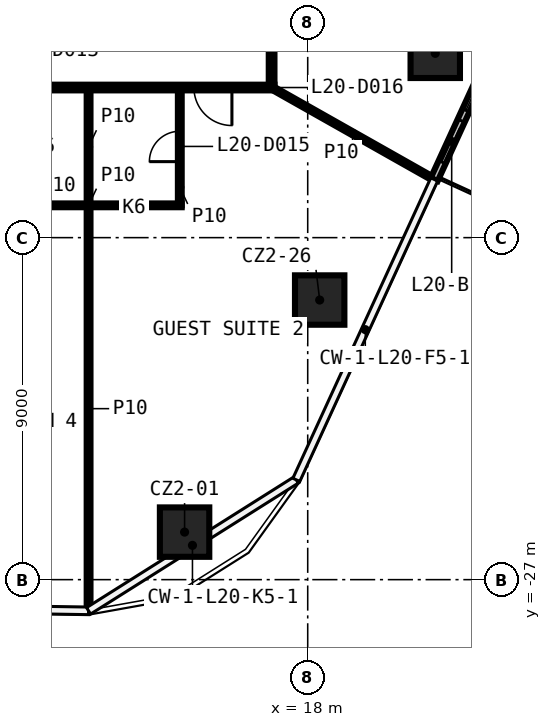
"""IFC4 building model, lengths in metres.
Left out: names, types, materials, properties, quantities, classifications, styles, units other than length and angle.
Written with IfcOpenShell. Run it as: python <this file> out.ifc"""

import sys

from ifc_helpers import new_model, si_unit, direction, frame, frame_2d, origin, origin_2d, place, context, subcontext, project, spatial, rectangle, extrude, element, fill, save


model = new_model("IFC4")
c1 = context("Model", 3, precision=1e-05, world=origin(), true_north=direction((0.0, 1.0)))
c2 = subcontext(c1, "Body", "Model", "MODEL_VIEW")
j1 = project(units=[si_unit("LENGTHUNIT", "METRE"), si_unit("PLANEANGLEUNIT", "RADIAN")], contexts=[c1])
p1 = place(None, origin())
s1 = spatial("IfcSite", under=j1, at=p1, CompositionType="ELEMENT")
p2 = place(p1, origin())
s2 = spatial("IfcBuilding", under=s1, at=p2, CompositionType="ELEMENT")
p3 = place(p2, frame((0.0, 0.0, 98.9)))
s3 = spatial("IfcBuildingStorey", under=s2, at=p3, CompositionType="ELEMENT", Elevation=98.9)
for number, where, z_axis, x_axis in (
    (1, (14.76, -25.749, 0.0), (0.0, 0.0, 1.0), (1.0, 0.0, 0.0)),
    (2, (21.356, -13.15, 0.0), (0.0, 0.0, 1.0), (1.0, 0.0, 0.0)),
    (3, (18.315, -19.642, 0.0), (0.0, 0.0, 1.0), (1.0, 0.0, 0.0)),
):
    element("IfcColumn", number, at=place(p3, frame(where, z_axis=z_axis, x_axis=x_axis)), inside=s3, PredefinedType="COLUMN", context=c2, shape_type="SweptSolid", body=[
        extrude(rectangle(XDim=1.3, YDim=1.3, at=origin_2d()), origin(), (0.0, 0.0, 1.0), 3.25),
    ])
p4 = place(p3, frame((9.784, -17.15, 0.0), z_axis=(0.0, 0.0, 1.0), x_axis=(1.0, 0.0, 0.0)))
e4 = element("IfcWall", 4, at=p4, inside=s3, PredefinedType="PARTITIONING", context=c2, shape_type="SweptSolid", body=[
    extrude(rectangle(XDim=4.9, YDim=0.1, at=frame_2d((2.45, 0.0))), origin(), (0.0, 0.0, 1.0), 3.25),
])
p5 = place(p3, frame((17.125, -14.05, 0.0), z_axis=(0.0, 0.0, 1.0), x_axis=(-1.0, 0.0, 0.0)))
e5 = element("IfcWall", 5, at=p5, inside=s3, PredefinedType="PARTITIONING", context=c2, shape_type="SweptSolid", body=[
    extrude(rectangle(XDim=34.25, YDim=0.15, at=frame_2d((17.125, 0.0))), origin(), (0.0, 0.0, 1.0), 3.25),
])
p6 = place(p5, frame((32.158, 0.0, 0.0)))
e6 = element("IfcOpeningElement", 6, at=p6, cuts=e5, PredefinedType="OPENING", context=c2, shape_type="SweptSolid", body=[
    extrude(rectangle(XDim=0.9, YDim=2.1, at=frame_2d((0.45, 1.05))), frame((0.0, 0.085, 0.0), z_axis=(0.0, -1.0, 0.0), x_axis=(1.0, 0.0, 0.0)), (0.0, 0.0, 1.0), 0.17),
])
p7 = place(p5, frame((27.561, 0.0, 0.0)))
e7 = element("IfcOpeningElement", 7, at=p7, cuts=e5, PredefinedType="OPENING", context=c2, shape_type="SweptSolid", body=[
    extrude(rectangle(XDim=1.0, YDim=2.1, at=frame_2d((0.5, 1.05))), frame((0.0, 0.085, 0.0), z_axis=(0.0, -1.0, 0.0), x_axis=(1.0, 0.0, 0.0)), (0.0, 0.0, 1.0), 0.17),
])
p8 = place(p5, frame((18.64, 0.0, 0.0)))
e8 = element("IfcOpeningElement", 8, at=p8, cuts=e5, PredefinedType="OPENING", context=c2, shape_type="SweptSolid", body=[
    extrude(rectangle(XDim=1.0, YDim=2.1, at=frame_2d((0.5, 1.05))), frame((0.0, 0.085, 0.0), z_axis=(0.0, -1.0, 0.0), x_axis=(1.0, 0.0, 0.0)), (0.0, 0.0, 1.0), 0.17),
])
p9 = place(p5, frame((16.624, 0.0, 0.0)))
e9 = element("IfcOpeningElement", 9, at=p9, cuts=e5, PredefinedType="OPENING", context=c2, shape_type="SweptSolid", body=[
    extrude(rectangle(XDim=1.0, YDim=2.1, at=frame_2d((0.5, 1.05))), frame((0.0, 0.085, 0.0), z_axis=(0.0, -1.0, 0.0), x_axis=(1.0, 0.0, 0.0)), (0.0, 0.0, 1.0), 0.17),
])
p10 = place(p5, frame((9.807, 0.0, 0.0)))
e10 = element("IfcOpeningElement", 10, at=p10, cuts=e5, PredefinedType="OPENING", context=c2, shape_type="SweptSolid", body=[
    extrude(rectangle(XDim=1.0, YDim=2.1, at=frame_2d((0.5, 1.05))), frame((0.0, 0.085, 0.0), z_axis=(0.0, -1.0, 0.0), x_axis=(1.0, 0.0, 0.0)), (0.0, 0.0, 1.0), 0.17),
])
p11 = place(p5, frame((7.795, 0.0, 0.0)))
e11 = element("IfcOpeningElement", 11, at=p11, cuts=e5, PredefinedType="OPENING", context=c2, shape_type="SweptSolid", body=[
    extrude(rectangle(XDim=1.0, YDim=2.1, at=frame_2d((0.5, 1.05))), frame((0.0, 0.085, 0.0), z_axis=(0.0, -1.0, 0.0), x_axis=(1.0, 0.0, 0.0)), (0.0, 0.0, 1.0), 0.17),
])
p12 = place(p5, frame((1.119, 0.0, 0.0)))
e12 = element("IfcOpeningElement", 12, at=p12, cuts=e5, PredefinedType="OPENING", context=c2, shape_type="SweptSolid", body=[
    extrude(rectangle(XDim=1.0, YDim=2.1, at=frame_2d((0.5, 1.05))), frame((0.0, 0.085, 0.0), z_axis=(0.0, -1.0, 0.0), x_axis=(1.0, 0.0, 0.0)), (0.0, 0.0, 1.0), 0.17),
])
p13 = place(p3, frame((17.05, 13.975, 0.0), z_axis=(0.0, 0.0, 1.0), x_axis=(0.0, -1.0, 0.0)))
e13 = element("IfcWall", 13, at=p13, inside=s3, PredefinedType="PARTITIONING", context=c2, shape_type="SweptSolid", body=[
    extrude(rectangle(XDim=27.95, YDim=0.15, at=frame_2d((13.975, 0.0))), origin(), (0.0, 0.0, 1.0), 3.25),
])
p14 = place(p13, frame((25.274, 0.0, 0.0)))
e14 = element("IfcOpeningElement", 14, at=p14, cuts=e13, PredefinedType="OPENING", context=c2, shape_type="SweptSolid", body=[
    extrude(rectangle(XDim=0.9, YDim=2.1, at=frame_2d((0.45, 1.05))), frame((0.0, 0.085, 0.0), z_axis=(0.0, -1.0, 0.0), x_axis=(1.0, 0.0, 0.0)), (0.0, 0.0, 1.0), 0.17),
])
p15 = place(p13, frame((18.854, 0.0, 0.0)))
e15 = element("IfcOpeningElement", 15, at=p15, cuts=e13, PredefinedType="OPENING", context=c2, shape_type="SweptSolid", body=[
    extrude(rectangle(XDim=1.0, YDim=2.1, at=frame_2d((0.5, 1.05))), frame((0.0, 0.085, 0.0), z_axis=(0.0, -1.0, 0.0), x_axis=(1.0, 0.0, 0.0)), (0.0, 0.0, 1.0), 0.17),
])
p16 = place(p13, frame((17.299, 0.0, 0.0)))
e16 = element("IfcOpeningElement", 16, at=p16, cuts=e13, PredefinedType="OPENING", context=c2, shape_type="SweptSolid", body=[
    extrude(rectangle(XDim=1.0, YDim=2.1, at=frame_2d((0.5, 1.05))), frame((0.0, 0.085, 0.0), z_axis=(0.0, -1.0, 0.0), x_axis=(1.0, 0.0, 0.0)), (0.0, 0.0, 1.0), 0.17),
])
p17 = place(p13, frame((11.171, 0.0, 0.0)))
e17 = element("IfcOpeningElement", 17, at=p17, cuts=e13, PredefinedType="OPENING", context=c2, shape_type="SweptSolid", body=[
    extrude(rectangle(XDim=0.9, YDim=2.1, at=frame_2d((0.45, 1.05))), frame((0.0, 0.085, 0.0), z_axis=(0.0, -1.0, 0.0), x_axis=(1.0, 0.0, 0.0)), (0.0, 0.0, 1.0), 0.17),
])
p18 = place(p13, frame((7.243, 0.0, 0.0)))
e18 = element("IfcOpeningElement", 18, at=p18, cuts=e13, PredefinedType="OPENING", context=c2, shape_type="SweptSolid", body=[
    extrude(rectangle(XDim=0.9, YDim=2.1, at=frame_2d((0.45, 1.05))), frame((0.0, 0.085, 0.0), z_axis=(0.0, -1.0, 0.0), x_axis=(1.0, 0.0, 0.0)), (0.0, 0.0, 1.0), 0.17),
])
p19 = place(p13, frame((2.153, 0.0, 0.0)))
e19 = element("IfcOpeningElement", 19, at=p19, cuts=e13, PredefinedType="OPENING", context=c2, shape_type="SweptSolid", body=[
    extrude(rectangle(XDim=0.9, YDim=2.1, at=frame_2d((0.45, 1.05))), frame((0.0, 0.085, 0.0), z_axis=(0.0, -1.0, 0.0), x_axis=(1.0, 0.0, 0.0)), (0.0, 0.0, 1.0), 0.17),
])
p20 = place(p3, frame((14.634, -17.15, 0.0), z_axis=(0.0, 0.0, 1.0), x_axis=(0.0, 1.0, 0.0)))
e20 = element("IfcWall", 20, at=p20, inside=s3, PredefinedType="PARTITIONING", context=c2, shape_type="SweptSolid", body=[
    extrude(rectangle(XDim=3.025, YDim=0.1, at=frame_2d((1.512, 0.0))), origin(), (0.0, 0.0, 1.0), 3.25),
])
p21 = place(p20, frame((1.15, 0.0, 0.0)))
e21 = element("IfcOpeningElement", 21, at=p21, cuts=e20, PredefinedType="OPENING", context=c2, shape_type="SweptSolid", body=[
    extrude(rectangle(XDim=0.8, YDim=2.1, at=frame_2d((0.4, 1.05))), frame((0.0, 0.06, 0.0), z_axis=(0.0, -1.0, 0.0), x_axis=(1.0, 0.0, 0.0)), (0.0, 0.0, 1.0), 0.12),
])
p22 = place(p3, frame((12.234, -27.801, 0.0), z_axis=(0.0, 0.0, 1.0), x_axis=(0.0, 1.0, 0.0)))
e22 = element("IfcWall", 22, at=p22, inside=s3, PredefinedType="PARTITIONING", context=c2, shape_type="SweptSolid", body=[
    extrude(rectangle(XDim=10.601, YDim=0.1, at=frame_2d((5.3, 0.0))), origin(), (0.0, 0.0, 1.0), 3.25),
])
p23 = place(p3, frame((12.234, -17.1, 0.0), z_axis=(0.0, 0.0, 1.0), x_axis=(0.0, 1.0, 0.0)))
e23 = element("IfcWall", 23, at=p23, inside=s3, PredefinedType="PARTITIONING", context=c2, shape_type="SweptSolid", body=[
    extrude(rectangle(XDim=2.975, YDim=0.1, at=frame_2d((1.488, 0.0))), origin(), (0.0, 0.0, 1.0), 3.25),
])
p24 = place(p3, frame((17.05, -14.05, 0.0), z_axis=(0.0, 0.0, 1.0), x_axis=(0.87059349, -0.492003023537, 0.0)))
e24 = element("IfcWall", 24, at=p24, inside=s3, PredefinedType="PARTITIONING", context=c2, shape_type="SweptSolid", body=[
    extrude(rectangle(XDim=4.895, YDim=0.1, at=frame_2d((2.448, 0.0))), origin(), (0.0, 0.0, 1.0), 3.25),
])
p25 = place(p3, frame((21.329, -16.468, 0.0), z_axis=(0.0, 0.0, 1.0), x_axis=(0.417117833448, 0.908852415423, 0.0)))
e25 = element("IfcWall", 25, at=p25, inside=s3, PredefinedType="SOLIDWALL", context=c2, shape_type="SweptSolid", body=[
    extrude(rectangle(XDim=21.761, YDim=0.2, at=frame_2d((10.881, 0.0))), origin(), (0.0, 0.0, 1.0), 3.25),
])
p26 = place(p25, frame((2.0, 0.0, 0.6)))
e26 = element("IfcOpeningElement", 26, at=p26, cuts=e25, PredefinedType="OPENING", context=c2, shape_type="SweptSolid", body=[
    extrude(rectangle(XDim=1.6, YDim=2.4, at=frame_2d((0.8, 1.2))), frame((0.0, 0.11, 0.0), z_axis=(0.0, -1.0, 0.0), x_axis=(1.0, 0.0, 0.0)), (0.0, 0.0, 1.0), 0.22),
])
p27 = place(p25, frame((0.5, 0.0, 0.0)))
e27 = element("IfcOpeningElement", 27, at=p27, cuts=e25, PredefinedType="OPENING", context=c2, shape_type="SweptSolid", body=[
    extrude(rectangle(XDim=1.2, YDim=2.4, at=frame_2d((0.6, 1.2))), frame((0.0, 0.11, 0.0), z_axis=(0.0, -1.0, 0.0), x_axis=(1.0, 0.0, 0.0)), (0.0, 0.0, 1.0), 0.22),
])
p28 = place(p25, frame((6.352, 0.0, 0.6)))
e28 = element("IfcOpeningElement", 28, at=p28, cuts=e25, PredefinedType="OPENING", context=c2, shape_type="SweptSolid", body=[
    extrude(rectangle(XDim=1.6, YDim=2.4, at=frame_2d((0.8, 1.2))), frame((0.0, 0.11, 0.0), z_axis=(0.0, -1.0, 0.0), x_axis=(1.0, 0.0, 0.0)), (0.0, 0.0, 1.0), 0.22),
])
p29 = place(p25, frame((4.852, 0.0, 0.0)))
e29 = element("IfcOpeningElement", 29, at=p29, cuts=e25, PredefinedType="OPENING", context=c2, shape_type="SweptSolid", body=[
    extrude(rectangle(XDim=1.2, YDim=2.4, at=frame_2d((0.6, 1.2))), frame((0.0, 0.11, 0.0), z_axis=(0.0, -1.0, 0.0), x_axis=(1.0, 0.0, 0.0)), (0.0, 0.0, 1.0), 0.22),
])
p30 = place(p25, frame((9.205, 0.0, 0.6)))
e30 = element("IfcOpeningElement", 30, at=p30, cuts=e25, PredefinedType="OPENING", context=c2, shape_type="SweptSolid", body=[
    extrude(rectangle(XDim=1.6, YDim=2.4, at=frame_2d((0.8, 1.2))), frame((0.0, 0.11, 0.0), z_axis=(0.0, -1.0, 0.0), x_axis=(1.0, 0.0, 0.0)), (0.0, 0.0, 1.0), 0.22),
])
p31 = place(p25, frame((11.205, 0.0, 0.0)))
e31 = element("IfcOpeningElement", 31, at=p31, cuts=e25, PredefinedType="OPENING", context=c2, shape_type="SweptSolid", body=[
    extrude(rectangle(XDim=1.2, YDim=2.4, at=frame_2d((0.6, 1.2))), frame((0.0, 0.11, 0.0), z_axis=(0.0, -1.0, 0.0), x_axis=(1.0, 0.0, 0.0)), (0.0, 0.0, 1.0), 0.22),
])
p32 = place(p25, frame((15.057, 0.0, 0.6)))
e32 = element("IfcOpeningElement", 32, at=p32, cuts=e25, PredefinedType="OPENING", context=c2, shape_type="SweptSolid", body=[
    extrude(rectangle(XDim=1.6, YDim=2.4, at=frame_2d((0.8, 1.2))), frame((0.0, 0.11, 0.0), z_axis=(0.0, -1.0, 0.0), x_axis=(1.0, 0.0, 0.0)), (0.0, 0.0, 1.0), 0.22),
])
p33 = place(p25, frame((13.557, 0.0, 0.0)))
e33 = element("IfcOpeningElement", 33, at=p33, cuts=e25, PredefinedType="OPENING", context=c2, shape_type="SweptSolid", body=[
    extrude(rectangle(XDim=1.2, YDim=2.4, at=frame_2d((0.6, 1.2))), frame((0.0, 0.11, 0.0), z_axis=(0.0, -1.0, 0.0), x_axis=(1.0, 0.0, 0.0)), (0.0, 0.0, 1.0), 0.22),
])
p34 = place(p25, frame((19.909, 0.0, 0.6)))
e34 = element("IfcOpeningElement", 34, at=p34, cuts=e25, PredefinedType="OPENING", context=c2, shape_type="SweptSolid", body=[
    extrude(rectangle(XDim=1.6, YDim=2.4, at=frame_2d((0.8, 1.2))), frame((0.0, 0.11, 0.0), z_axis=(0.0, -1.0, 0.0), x_axis=(1.0, 0.0, 0.0)), (0.0, 0.0, 1.0), 0.22),
])
p35 = place(p25, frame((18.409, 0.0, 0.0)))
e35 = element("IfcOpeningElement", 35, at=p35, cuts=e25, PredefinedType="OPENING", context=c2, shape_type="SweptSolid", body=[
    extrude(rectangle(XDim=1.2, YDim=2.4, at=frame_2d((0.6, 1.2))), frame((0.0, 0.11, 0.0), z_axis=(0.0, -1.0, 0.0), x_axis=(1.0, 0.0, 0.0)), (0.0, 0.0, 1.0), 0.22),
])
p36 = place(p21, origin())
e36 = element("IfcDoor", 36, at=p36, inside=s3, OperationType="SINGLE_SWING_LEFT", PredefinedType="DOOR", context=c2, shape_type="SweptSolid", body=[
    extrude(rectangle(XDim=0.8, YDim=2.1, at=frame_2d((0.4, 1.05))), frame((0.0, 0.025, 0.0), z_axis=(0.0, -1.0, 0.0), x_axis=(1.0, 0.0, 0.0)), (0.0, 0.0, 1.0), 0.05),
])
fill(e21, e36)
p37 = place(p12, origin())
e37 = element("IfcDoor", 37, at=p37, inside=s3, OperationType="SINGLE_SWING_RIGHT", PredefinedType="DOOR", context=c2, shape_type="SweptSolid", body=[
    extrude(rectangle(XDim=1.0, YDim=2.1, at=frame_2d((0.5, 1.05))), frame((0.0, 0.025, 0.0), z_axis=(0.0, -1.0, 0.0), x_axis=(1.0, 0.0, 0.0)), (0.0, 0.0, 1.0), 0.05),
])
fill(e12, e37)
p38 = place(p26, origin())
e38 = element("IfcWindow", 38, at=p38, inside=s3, PartitioningType="SINGLE_PANEL", PredefinedType="WINDOW", context=c2, shape_type="SweptSolid", body=[
    extrude(rectangle(XDim=1.6, YDim=2.4, at=frame_2d((0.8, 1.2))), frame((0.0, 0.03, 0.0), z_axis=(0.0, -1.0, 0.0), x_axis=(1.0, 0.0, 0.0)), (0.0, 0.0, 1.0), 0.06),
])
fill(e26, e38)
p39 = place(p27, origin())
e39 = element("IfcDoor", 39, at=p39, inside=s3, OperationType="SLIDING_TO_LEFT", PredefinedType="DOOR", context=c2, shape_type="SweptSolid", body=[
    extrude(rectangle(XDim=1.2, YDim=2.4, at=frame_2d((0.6, 1.2))), frame((0.0, 0.025, 0.0), z_axis=(0.0, -1.0, 0.0), x_axis=(1.0, 0.0, 0.0)), (0.0, 0.0, 1.0), 0.05),
])
fill(e27, e39)
save(model, sys.argv[1])
